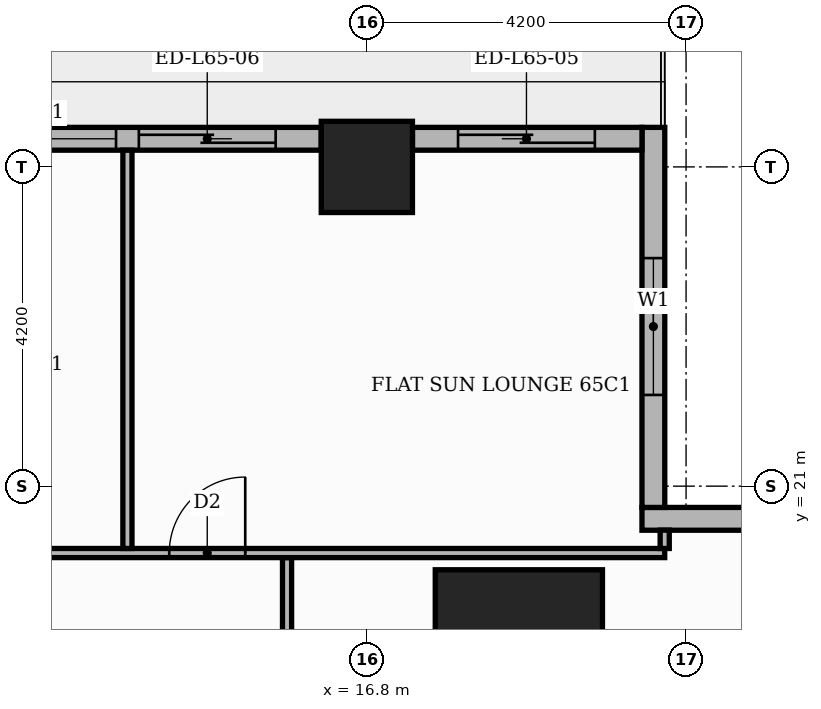
"""IFC4 building model, lengths in metres.
Left out: names, types, materials, properties, quantities, classifications, styles, units other than length and angle.
Written with IfcOpenShell. Run it as: python <this file> out.ifc"""

import sys

from ifc_helpers import new_model, si_unit, direction, frame, frame_2d, origin, origin_2d, place, context, subcontext, project, spatial, rectangle, extrude, element, fill, save


model = new_model("IFC4")
c1 = context("Model", 3, precision=1e-05, world=origin(), true_north=direction((0.0, 1.0)))
c2 = subcontext(c1, "Body", "Model", "MODEL_VIEW")
j1 = project(units=[si_unit("LENGTHUNIT", "METRE"), si_unit("PLANEANGLEUNIT", "RADIAN")], contexts=[c1])
p1 = place(None, origin())
s1 = spatial("IfcSite", under=j1, at=p1, CompositionType="ELEMENT")
p2 = place(p1, origin())
s2 = spatial("IfcBuilding", under=s1, at=p2, CompositionType="ELEMENT")
p3 = place(p2, frame((0.0, 0.0, 271.8)))
s3 = spatial("IfcBuildingStorey", under=s2, at=p3, CompositionType="ELEMENT", Elevation=271.8)
p4 = place(p3, frame((18.8, 18.8, 0.0), z_axis=(0.0, 0.0, 1.0), x_axis=(1.0, 0.0, 0.0)))
e1 = element("IfcColumn", 1, at=p4, inside=s3, PredefinedType="COLUMN", context=c2, shape_type="SweptSolid", body=[
    extrude(rectangle(XDim=2.2, YDim=2.2, at=origin_2d()), origin(), (0.0, 0.0, 1.0), 3.9),
])
p5 = place(p3, frame((16.8, 25.2, 0.0), z_axis=(0.0, 0.0, 1.0), x_axis=(1.0, 0.0, 0.0)))
e2 = element("IfcColumn", 2, at=p5, inside=s3, PredefinedType="COLUMN", context=c2, shape_type="SweptSolid", body=[
    extrude(rectangle(XDim=1.2, YDim=1.2, at=origin_2d()), origin(), (0.0, 0.0, 1.0), 3.9),
])
p6 = place(p3, frame((25.42, 20.57, 0.0), z_axis=(0.0, 0.0, 1.0), x_axis=(-1.0, 0.0, 0.0)))
e3 = element("IfcWall", 3, at=p6, inside=s3, PredefinedType="STANDARD", context=c2, shape_type="SweptSolid", body=[
    extrude(rectangle(XDim=5.0, YDim=0.3, at=frame_2d((2.5, 0.0))), origin(), (0.0, 0.0, 1.0), 3.48),
])
p7 = place(p6, frame((1.42, 0.0, 0.9)))
e4 = element("IfcOpeningElement", 4, at=p7, cuts=e3, PredefinedType="OPENING", context=c2, shape_type="SweptSolid", body=[
    extrude(rectangle(XDim=1.8, YDim=2.1, at=frame_2d((0.9, 1.05))), frame((0.0, 0.16, 0.0), z_axis=(0.0, -1.0, 0.0), x_axis=(1.0, 0.0, 0.0)), (0.0, 0.0, 1.0), 0.32),
])
p8 = place(p3, frame((20.57, 20.72, 0.0), z_axis=(0.0, 0.0, 1.0), x_axis=(0.0, 1.0, 0.0)))
e5 = element("IfcWall", 5, at=p8, inside=s3, PredefinedType="STANDARD", context=c2, shape_type="SweptSolid", body=[
    extrude(rectangle(XDim=5.0, YDim=0.3, at=frame_2d((2.5, 0.0))), origin(), (0.0, 0.0, 1.0), 3.48),
])
p9 = place(p8, frame((1.48, 0.0, 0.9)))
e6 = element("IfcOpeningElement", 6, at=p9, cuts=e5, PredefinedType="OPENING", context=c2, shape_type="SweptSolid", body=[
    extrude(rectangle(XDim=1.8, YDim=2.1, at=frame_2d((0.9, 1.05))), frame((0.0, 0.16, 0.0), z_axis=(0.0, -1.0, 0.0), x_axis=(1.0, 0.0, 0.0)), (0.0, 0.0, 1.0), 0.32),
])
p10 = place(p3, frame((20.42, 25.57, 0.0), z_axis=(0.0, 0.0, 1.0), x_axis=(-1.0, 0.0, 0.0)))
e7 = element("IfcWall", 7, at=p10, inside=s3, PredefinedType="STANDARD", context=c2, shape_type="SweptSolid", body=[
    extrude(rectangle(XDim=3.02, YDim=0.3, at=frame_2d((1.51, 0.0))), origin(), (0.0, 0.0, 1.0), 3.48),
])
p11 = place(p10, frame((0.62, 0.0, 0.0)))
e8 = element("IfcOpeningElement", 8, at=p11, cuts=e7, PredefinedType="OPENING", context=c2, shape_type="SweptSolid", body=[
    extrude(rectangle(XDim=1.8, YDim=2.4, at=frame_2d((0.9, 1.2))), frame((0.0, 0.16, 0.0), z_axis=(0.0, -1.0, 0.0), x_axis=(1.0, 0.0, 0.0)), (0.0, 0.0, 1.0), 0.32),
])
p12 = place(p3, frame((16.2, 25.57, 0.0), z_axis=(0.0, 0.0, 1.0), x_axis=(-1.0, 0.0, 0.0)))
e9 = element("IfcWall", 9, at=p12, inside=s3, PredefinedType="STANDARD", context=c2, shape_type="SweptSolid", body=[
    extrude(rectangle(XDim=7.2, YDim=0.3, at=frame_2d((3.6, 0.0))), origin(), (0.0, 0.0, 1.0), 3.48),
])
p13 = place(p12, frame((0.6, 0.0, 0.0)))
e10 = element("IfcOpeningElement", 10, at=p13, cuts=e9, PredefinedType="OPENING", context=c2, shape_type="SweptSolid", body=[
    extrude(rectangle(XDim=1.8, YDim=2.4, at=frame_2d((0.9, 1.2))), frame((0.0, 0.16, 0.0), z_axis=(0.0, -1.0, 0.0), x_axis=(1.0, 0.0, 0.0)), (0.0, 0.0, 1.0), 0.32),
])
p14 = place(p12, frame((2.7, 0.0, 0.9)))
e11 = element("IfcOpeningElement", 11, at=p14, cuts=e9, PredefinedType="OPENING", context=c2, shape_type="SweptSolid", body=[
    extrude(rectangle(XDim=1.8, YDim=2.1, at=frame_2d((0.9, 1.05))), frame((0.0, 0.16, 0.0), z_axis=(0.0, -1.0, 0.0), x_axis=(1.0, 0.0, 0.0)), (0.0, 0.0, 1.0), 0.32),
])
p15 = place(p12, frame((4.8, 0.0, 0.0)))
e12 = element("IfcOpeningElement", 12, at=p15, cuts=e9, PredefinedType="OPENING", context=c2, shape_type="SweptSolid", body=[
    extrude(rectangle(XDim=1.8, YDim=2.4, at=frame_2d((0.9, 1.2))), frame((0.0, 0.16, 0.0), z_axis=(0.0, -1.0, 0.0), x_axis=(1.0, 0.0, 0.0)), (0.0, 0.0, 1.0), 0.32),
])
p16 = place(p3, frame((15.75, 13.75, 0.0), z_axis=(0.0, 0.0, 1.0), x_axis=(0.0, 1.0, 0.0)))
e13 = element("IfcWall", 13, at=p16, inside=s3, PredefinedType="PARTITIONING", context=c2, shape_type="SweptSolid", body=[
    extrude(rectangle(XDim=6.31, YDim=0.12, at=frame_2d((3.155, 0.0))), origin(), (0.0, 0.0, 1.0), 3.48),
])
p17 = place(p16, frame((2.685, 0.0, 0.0)))
e14 = element("IfcOpeningElement", 14, at=p17, cuts=e13, PredefinedType="OPENING", context=c2, shape_type="SweptSolid", body=[
    extrude(rectangle(XDim=0.9, YDim=2.1, at=frame_2d((0.45, 1.05))), frame((0.0, 0.07, 0.0), z_axis=(0.0, -1.0, 0.0), x_axis=(1.0, 0.0, 0.0)), (0.0, 0.0, 1.0), 0.14),
])
p18 = place(p3, frame((-13.55, 20.12, 0.0), z_axis=(0.0, 0.0, 1.0), x_axis=(1.0, 0.0, 0.0)))
e15 = element("IfcWall", 15, at=p18, inside=s3, PredefinedType="PARTITIONING", context=c2, shape_type="SweptSolid", body=[
    extrude(rectangle(XDim=34.269, YDim=0.12, at=frame_2d((17.135, 0.0))), origin(), (0.0, 0.0, 1.0), 3.48),
])
p19 = place(p18, frame((27.75, 0.0, 0.0)))
e16 = element("IfcOpeningElement", 16, at=p19, cuts=e15, PredefinedType="OPENING", context=c2, shape_type="SweptSolid", body=[
    extrude(rectangle(XDim=1.0, YDim=2.1, at=frame_2d((0.5, 1.05))), frame((0.0, 0.07, 0.0), z_axis=(0.0, -1.0, 0.0), x_axis=(1.0, 0.0, 0.0)), (0.0, 0.0, 1.0), 0.14),
])
p20 = place(p18, frame((22.5, 0.0, 0.0)))
e17 = element("IfcOpeningElement", 17, at=p20, cuts=e15, PredefinedType="OPENING", context=c2, shape_type="SweptSolid", body=[
    extrude(rectangle(XDim=1.0, YDim=2.1, at=frame_2d((0.5, 1.05))), frame((0.0, 0.07, 0.0), z_axis=(0.0, -1.0, 0.0), x_axis=(1.0, 0.0, 0.0)), (0.0, 0.0, 1.0), 0.14),
])
p21 = place(p18, frame((14.15, 0.0, 0.0)))
e18 = element("IfcOpeningElement", 18, at=p21, cuts=e15, PredefinedType="OPENING", context=c2, shape_type="SweptSolid", body=[
    extrude(rectangle(XDim=0.9, YDim=2.1, at=frame_2d((0.45, 1.05))), frame((0.0, 0.07, 0.0), z_axis=(0.0, -1.0, 0.0), x_axis=(1.0, 0.0, 0.0)), (0.0, 0.0, 1.0), 0.14),
])
p22 = place(p18, frame((3.65, 0.0, 0.0)))
e19 = element("IfcOpeningElement", 19, at=p22, cuts=e15, PredefinedType="OPENING", context=c2, shape_type="SweptSolid", body=[
    extrude(rectangle(XDim=0.9, YDim=2.1, at=frame_2d((0.45, 1.05))), frame((0.0, 0.07, 0.0), z_axis=(0.0, -1.0, 0.0), x_axis=(1.0, 0.0, 0.0)), (0.0, 0.0, 1.0), 0.14),
])
p23 = place(p3, frame((13.65, 20.18, 0.0), z_axis=(0.0, 0.0, 1.0), x_axis=(0.0, 1.0, 0.0)))
e20 = element("IfcWall", 20, at=p23, inside=s3, PredefinedType="PARTITIONING", context=c2, shape_type="SweptSolid", body=[
    extrude(rectangle(XDim=5.24, YDim=0.12, at=frame_2d((2.62, 0.0))), origin(), (0.0, 0.0, 1.0), 3.48),
])
p24 = place(p3, frame((20.719, 20.18, 0.0), z_axis=(0.0, 0.0, 1.0), x_axis=(0.0, 1.0, 0.0)))
e21 = element("IfcWall", 21, at=p24, inside=s3, PredefinedType="PARTITIONING", context=c2, shape_type="SweptSolid", body=[
    extrude(rectangle(XDim=0.241, YDim=0.12, at=frame_2d((0.121, 0.0))), origin(), (0.0, 0.0, 1.0), 3.48),
])
p25 = place(p9, origin())
e22 = element("IfcWindow", 22, at=p25, inside=s3, PartitioningType="SINGLE_PANEL", PredefinedType="WINDOW", context=c2, shape_type="SweptSolid", body=[
    extrude(rectangle(XDim=1.8, YDim=2.1, at=frame_2d((0.9, 1.05))), frame((0.0, 0.03, 0.0), z_axis=(0.0, -1.0, 0.0), x_axis=(1.0, 0.0, 0.0)), (0.0, 0.0, 1.0), 0.06),
])
fill(e6, e22)
p26 = place(p11, origin())
e23 = element("IfcDoor", 23, at=p26, inside=s3, OperationType="SLIDING_TO_RIGHT", PredefinedType="DOOR", context=c2, shape_type="SweptSolid", body=[
    extrude(rectangle(XDim=1.8, YDim=2.4, at=frame_2d((0.9, 1.2))), frame((0.0, 0.025, 0.0), z_axis=(0.0, -1.0, 0.0), x_axis=(1.0, 0.0, 0.0)), (0.0, 0.0, 1.0), 0.05),
])
fill(e8, e23)
p27 = place(p13, origin())
e24 = element("IfcDoor", 24, at=p27, inside=s3, OperationType="SLIDING_TO_LEFT", PredefinedType="DOOR", context=c2, shape_type="SweptSolid", body=[
    extrude(rectangle(XDim=1.8, YDim=2.4, at=frame_2d((0.9, 1.2))), frame((0.0, 0.025, 0.0), z_axis=(0.0, -1.0, 0.0), x_axis=(1.0, 0.0, 0.0)), (0.0, 0.0, 1.0), 0.05),
])
fill(e10, e24)
p28 = place(p14, origin())
e25 = element("IfcWindow", 25, at=p28, inside=s3, PartitioningType="SINGLE_PANEL", PredefinedType="WINDOW", context=c2, shape_type="SweptSolid", body=[
    extrude(rectangle(XDim=1.8, YDim=2.1, at=frame_2d((0.9, 1.05))), frame((0.0, 0.03, 0.0), z_axis=(0.0, -1.0, 0.0), x_axis=(1.0, 0.0, 0.0)), (0.0, 0.0, 1.0), 0.06),
])
fill(e11, e25)
p29 = place(p19, origin())
e26 = element("IfcDoor", 26, at=p29, inside=s3, OperationType="SINGLE_SWING_RIGHT", PredefinedType="DOOR", context=c2, shape_type="SweptSolid", body=[
    extrude(rectangle(XDim=1.0, YDim=2.1, at=frame_2d((0.5, 1.05))), frame((0.0, 0.025, 0.0), z_axis=(0.0, -1.0, 0.0), x_axis=(1.0, 0.0, 0.0)), (0.0, 0.0, 1.0), 0.05),
])
fill(e16, e26)
save(model, sys.argv[1])
